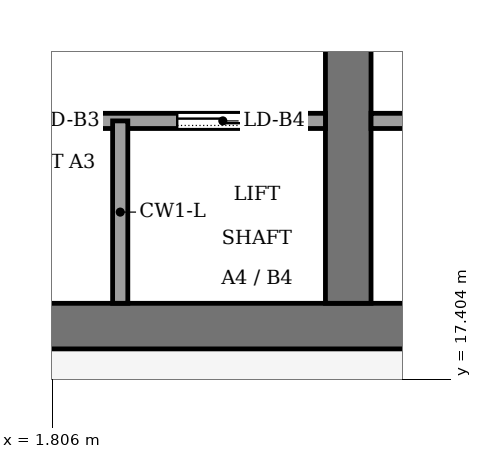
"""IFC4 building model, lengths in metres.
Left out: names, types, materials, properties, quantities, classifications, styles, units other than length and angle.
Written with IfcOpenShell. Run it as: python <this file> out.ifc"""

import sys

from ifc_helpers import new_model, si_unit, direction, frame, frame_2d, origin, place, context, subcontext, project, spatial, rectangle, extrude, element, fill, save


model = new_model("IFC4")
c1 = context("Model", 3, precision=1e-05, world=origin(), true_north=direction((0.0, 1.0)))
c2 = subcontext(c1, "Body", "Model", "MODEL_VIEW")
j1 = project(units=[si_unit("LENGTHUNIT", "METRE"), si_unit("PLANEANGLEUNIT", "RADIAN")], contexts=[c1])
p1 = place(None, origin())
s1 = spatial("IfcSite", under=j1, at=p1, CompositionType="ELEMENT")
p2 = place(p1, origin())
s2 = spatial("IfcBuilding", under=s1, at=p2, CompositionType="ELEMENT")
p3 = place(p2, frame((0.0, 0.0, 330.0)))
s3 = spatial("IfcBuildingStorey", under=s2, at=p3, CompositionType="ELEMENT", Elevation=330.0)
p4 = place(p3, frame((-13.2, 18.1, -0.13), z_axis=(0.0, 0.0, 1.0), x_axis=(1.0, 0.0, 0.0)))
e1 = element("IfcWall", 1, at=p4, inside=s3, PredefinedType="SHEAR", context=c2, shape_type="SweptSolid", body=[
    extrude(rectangle(XDim=26.4, YDim=0.6, at=frame_2d((13.2, 0.0))), origin(), (0.0, 0.0, 1.0), 3.95),
])
p5 = place(p3, frame((5.7, 18.4, -0.13), z_axis=(0.0, 0.0, 1.0), x_axis=(0.0, 1.0, 0.0)))
e2 = element("IfcWall", 2, at=p5, inside=s3, PredefinedType="SHEAR", context=c2, shape_type="SweptSolid", body=[
    extrude(rectangle(XDim=19.2, YDim=0.6, at=frame_2d((9.6, 0.0))), origin(), (0.0, 0.0, 1.0), 3.95),
])
p6 = place(p5, frame((8.35, 0.0, 0.13)))
e3 = element("IfcOpeningElement", 3, at=p6, cuts=e2, PredefinedType="OPENING", context=c2, shape_type="SweptSolid", body=[
    extrude(rectangle(XDim=0.9, YDim=2.1, at=frame_2d((0.45, 1.05))), frame((0.0, 0.31, 0.0), z_axis=(0.0, -1.0, 0.0), x_axis=(1.0, 0.0, 0.0)), (0.0, 0.0, 1.0), 0.62),
])
p7 = place(p5, frame((13.3, 0.0, 0.13)))
e4 = element("IfcOpeningElement", 4, at=p7, cuts=e2, PredefinedType="OPENING", context=c2, shape_type="SweptSolid", body=[
    extrude(rectangle(XDim=2.4, YDim=2.4, at=frame_2d((1.2, 1.2))), frame((0.0, 0.31, 0.0), z_axis=(0.0, -1.0, 0.0), x_axis=(1.0, 0.0, 0.0)), (0.0, 0.0, 1.0), 0.62),
])
p8 = place(p3, frame((-5.4, 20.8, 0.0), z_axis=(0.0, 0.0, 1.0), x_axis=(1.0, 0.0, 0.0)))
e5 = element("IfcWall", 5, at=p8, inside=s3, PredefinedType="PARTITIONING", context=c2, shape_type="SweptSolid", body=[
    extrude(rectangle(XDim=10.8, YDim=0.2, at=frame_2d((5.4, 0.0))), origin(), (0.0, 0.0, 1.0), 3.82),
])
p9 = place(p8, frame((0.75, 0.0, 0.0)))
e6 = element("IfcOpeningElement", 6, at=p9, cuts=e5, PredefinedType="OPENING", context=c2, shape_type="SweptSolid", body=[
    extrude(rectangle(XDim=1.2, YDim=2.2, at=frame_2d((0.6, 1.1))), frame((0.0, 0.11, 0.0), z_axis=(0.0, -1.0, 0.0), x_axis=(1.0, 0.0, 0.0)), (0.0, 0.0, 1.0), 0.22),
])
p10 = place(p8, frame((3.45, 0.0, 0.0)))
e7 = element("IfcOpeningElement", 7, at=p10, cuts=e5, PredefinedType="OPENING", context=c2, shape_type="SweptSolid", body=[
    extrude(rectangle(XDim=1.2, YDim=2.2, at=frame_2d((0.6, 1.1))), frame((0.0, 0.11, 0.0), z_axis=(0.0, -1.0, 0.0), x_axis=(1.0, 0.0, 0.0)), (0.0, 0.0, 1.0), 0.22),
])
p11 = place(p8, frame((6.15, 0.0, 0.0)))
e8 = element("IfcOpeningElement", 8, at=p11, cuts=e5, PredefinedType="OPENING", context=c2, shape_type="SweptSolid", body=[
    extrude(rectangle(XDim=1.2, YDim=2.2, at=frame_2d((0.6, 1.1))), frame((0.0, 0.11, 0.0), z_axis=(0.0, -1.0, 0.0), x_axis=(1.0, 0.0, 0.0)), (0.0, 0.0, 1.0), 0.22),
])
p12 = place(p8, frame((8.85, 0.0, 0.0)))
e9 = element("IfcOpeningElement", 9, at=p12, cuts=e5, PredefinedType="OPENING", context=c2, shape_type="SweptSolid", body=[
    extrude(rectangle(XDim=1.2, YDim=2.2, at=frame_2d((0.6, 1.1))), frame((0.0, 0.11, 0.0), z_axis=(0.0, -1.0, 0.0), x_axis=(1.0, 0.0, 0.0)), (0.0, 0.0, 1.0), 0.22),
])
p13 = place(p3, frame((6.0, 20.8, 0.0), z_axis=(0.0, 0.0, 1.0), x_axis=(1.0, 0.0, 0.0)))
e10 = element("IfcWall", 10, at=p13, inside=s3, PredefinedType="PARTITIONING", context=c2, shape_type="SweptSolid", body=[
    extrude(rectangle(XDim=6.6, YDim=0.2, at=frame_2d((3.3, 0.0))), origin(), (0.0, 0.0, 1.0), 3.82),
])
p14 = place(p13, frame((1.15, 0.0, 0.0)))
e11 = element("IfcOpeningElement", 11, at=p14, cuts=e10, PredefinedType="OPENING", context=c2, shape_type="SweptSolid", body=[
    extrude(rectangle(XDim=1.0, YDim=2.1, at=frame_2d((0.5, 1.05))), frame((0.0, 0.11, 0.0), z_axis=(0.0, -1.0, 0.0), x_axis=(1.0, 0.0, 0.0)), (0.0, 0.0, 1.0), 0.22),
])
p15 = place(p13, frame((4.45, 0.0, 0.0)))
e12 = element("IfcOpeningElement", 12, at=p15, cuts=e10, PredefinedType="OPENING", context=c2, shape_type="SweptSolid", body=[
    extrude(rectangle(XDim=1.0, YDim=2.1, at=frame_2d((0.5, 1.05))), frame((0.0, 0.11, 0.0), z_axis=(0.0, -1.0, 0.0), x_axis=(1.0, 0.0, 0.0)), (0.0, 0.0, 1.0), 0.22),
])
p16 = place(p3, frame((2.7, 18.4, 0.0), z_axis=(0.0, 0.0, 1.0), x_axis=(0.0, 1.0, 0.0)))
e13 = element("IfcWall", 13, at=p16, inside=s3, PredefinedType="PARTITIONING", context=c2, shape_type="SweptSolid", body=[
    extrude(rectangle(XDim=2.4, YDim=0.2, at=frame_2d((1.2, 0.0))), origin(), (0.0, 0.0, 1.0), 3.82),
])
p17 = place(p11, origin())
e14 = element("IfcDoor", 14, at=p17, inside=s3, OperationType="SLIDING_TO_LEFT", PredefinedType="DOOR", context=c2, shape_type="SweptSolid", body=[
    extrude(rectangle(XDim=1.2, YDim=2.2, at=frame_2d((0.6, 1.1))), frame((0.0, 0.025, 0.0), z_axis=(0.0, -1.0, 0.0), x_axis=(1.0, 0.0, 0.0)), (0.0, 0.0, 1.0), 0.05),
])
fill(e8, e14)
p18 = place(p12, origin())
e15 = element("IfcDoor", 15, at=p18, inside=s3, OperationType="SLIDING_TO_LEFT", PredefinedType="DOOR", context=c2, shape_type="SweptSolid", body=[
    extrude(rectangle(XDim=1.2, YDim=2.2, at=frame_2d((0.6, 1.1))), frame((0.0, 0.025, 0.0), z_axis=(0.0, -1.0, 0.0), x_axis=(1.0, 0.0, 0.0)), (0.0, 0.0, 1.0), 0.05),
])
fill(e9, e15)
save(model, sys.argv[1])
